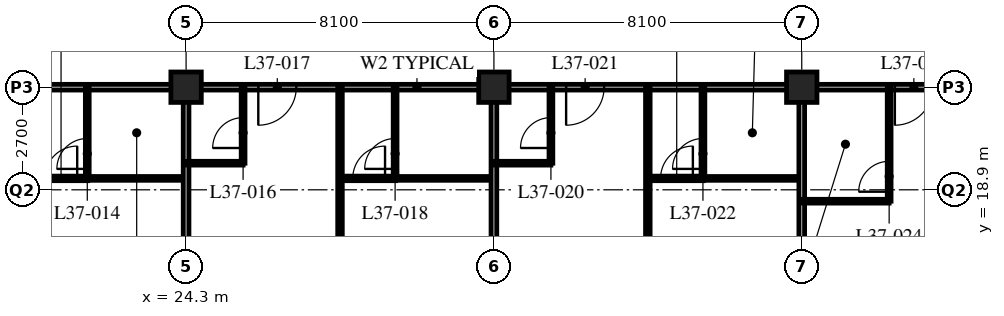
"""IFC4 building model, lengths in metres.
Left out: names, types, materials, properties, quantities, classifications, styles, units other than length and angle.
Written with IfcOpenShell. Run it as: python <this file> out.ifc"""

import sys

from ifc_helpers import new_model, si_unit, direction, frame, frame_2d, origin, origin_2d, place, context, subcontext, project, spatial, rectangle, hollow_rectangle, extrude, element, fill, save


model = new_model("IFC4")
c1 = context("Model", 3, precision=1e-05, world=origin(), true_north=direction((0.0, 1.0)))
c2 = subcontext(c1, "Body", "Model", "MODEL_VIEW")
j1 = project(units=[si_unit("LENGTHUNIT", "METRE"), si_unit("PLANEANGLEUNIT", "RADIAN")], contexts=[c1])
p1 = place(None, origin())
s1 = spatial("IfcSite", under=j1, at=p1, CompositionType="ELEMENT")
p2 = place(p1, origin())
s2 = spatial("IfcBuilding", under=s1, at=p2, CompositionType="ELEMENT")
p3 = place(p2, frame((0.0, 0.0, 144.2)))
s3 = spatial("IfcBuildingStorey", under=s2, at=p3, CompositionType="ELEMENT", Elevation=144.2)
for number, where, z_axis, x_axis in (
    (1, (24.3, 21.6, 0.0), (0.0, 0.0, 1.0), (1.0, 0.0, 0.0)),
    (2, (32.4, 21.6, 0.0), (0.0, 0.0, 1.0), (1.0, 0.0, 0.0)),
    (3, (40.5, 21.6, 0.0), (0.0, 0.0, 1.0), (1.0, 0.0, 0.0)),
):
    element("IfcColumn", number, at=place(p3, frame(where, z_axis=z_axis, x_axis=x_axis)), inside=s3, PredefinedType="COLUMN", context=c2, shape_type="SweptSolid", body=[
        extrude(hollow_rectangle(XDim=0.8, YDim=0.8, WallThickness=0.08, at=origin_2d()), origin(), (0.0, 0.0, 1.0), 3.4),
    ])
p4 = place(p3, frame((12.15, 21.6, 0.0), z_axis=(0.0, 0.0, 1.0), x_axis=(1.0, 0.0, 0.0)))
e4 = element("IfcWall", 4, at=p4, inside=s3, PredefinedType="PARTITIONING", context=c2, shape_type="SweptSolid", body=[
    extrude(rectangle(XDim=36.45, YDim=0.15, at=frame_2d((18.225, 0.0))), origin(), (0.0, 0.0, 1.0), 2.42),
])
p5 = place(p4, frame((5.95, 0.0, 0.0)))
e5 = element("IfcOpeningElement", 5, at=p5, cuts=e4, PredefinedType="OPENING", context=c2, shape_type="SweptSolid", body=[
    extrude(rectangle(XDim=1.0, YDim=2.1, at=frame_2d((0.5, 1.05))), frame((0.0, 0.085, 0.0), z_axis=(0.0, -1.0, 0.0), x_axis=(1.0, 0.0, 0.0)), (0.0, 0.0, 1.0), 0.17),
])
p6 = place(p4, frame((14.05, 0.0, 0.0)))
e6 = element("IfcOpeningElement", 6, at=p6, cuts=e4, PredefinedType="OPENING", context=c2, shape_type="SweptSolid", body=[
    extrude(rectangle(XDim=1.0, YDim=2.1, at=frame_2d((0.5, 1.05))), frame((0.0, 0.085, 0.0), z_axis=(0.0, -1.0, 0.0), x_axis=(1.0, 0.0, 0.0)), (0.0, 0.0, 1.0), 0.17),
])
p7 = place(p4, frame((22.15, 0.0, 0.0)))
e7 = element("IfcOpeningElement", 7, at=p7, cuts=e4, PredefinedType="OPENING", context=c2, shape_type="SweptSolid", body=[
    extrude(rectangle(XDim=1.0, YDim=2.1, at=frame_2d((0.5, 1.05))), frame((0.0, 0.085, 0.0), z_axis=(0.0, -1.0, 0.0), x_axis=(1.0, 0.0, 0.0)), (0.0, 0.0, 1.0), 0.17),
])
p8 = place(p4, frame((30.8, 0.0, 0.0)))
e8 = element("IfcOpeningElement", 8, at=p8, cuts=e4, PredefinedType="OPENING", context=c2, shape_type="SweptSolid", body=[
    extrude(rectangle(XDim=1.0, YDim=2.1, at=frame_2d((0.5, 1.05))), frame((0.0, 0.085, 0.0), z_axis=(0.0, -1.0, 0.0), x_axis=(1.0, 0.0, 0.0)), (0.0, 0.0, 1.0), 0.17),
])
p9 = place(p4, frame((1.525, 0.0, 0.0)))
e9 = element("IfcOpeningElement", 9, at=p9, cuts=e4, PredefinedType="OPENING", context=c2, shape_type="SweptSolid", body=[
    extrude(rectangle(XDim=1.0, YDim=2.1, at=frame_2d((0.5, 1.05))), frame((0.0, 0.085, 0.0), z_axis=(0.0, -1.0, 0.0), x_axis=(1.0, 0.0, 0.0)), (0.0, 0.0, 1.0), 0.17),
])
p10 = place(p4, frame((33.925, 0.0, 0.0)))
e10 = element("IfcOpeningElement", 10, at=p10, cuts=e4, PredefinedType="OPENING", context=c2, shape_type="SweptSolid", body=[
    extrude(rectangle(XDim=1.0, YDim=2.1, at=frame_2d((0.5, 1.05))), frame((0.0, 0.085, 0.0), z_axis=(0.0, -1.0, 0.0), x_axis=(1.0, 0.0, 0.0)), (0.0, 0.0, 1.0), 0.17),
])
p11 = place(p3, frame((21.7, 19.2, 0.0), z_axis=(0.0, 0.0, 1.0), x_axis=(1.0, 0.0, 0.0)))
e11 = element("IfcWall", 11, at=p11, inside=s3, PredefinedType="PARTITIONING", context=c2, shape_type="SweptSolid", body=[
    extrude(rectangle(XDim=2.6, YDim=0.1, at=frame_2d((1.3, 0.0))), origin(), (0.0, 0.0, 1.0), 3.19),
])
p12 = place(p3, frame((21.7, 21.6, 0.0), z_axis=(0.0, 0.0, 1.0), x_axis=(0.0, -1.0, 0.0)))
e12 = element("IfcWall", 12, at=p12, inside=s3, PredefinedType="PARTITIONING", context=c2, shape_type="SweptSolid", body=[
    extrude(rectangle(XDim=2.4, YDim=0.1, at=frame_2d((1.2, 0.0))), origin(), (0.0, 0.0, 1.0), 3.19),
])
p13 = place(p12, frame((1.35, 0.0, 0.0)))
e13 = element("IfcOpeningElement", 13, at=p13, cuts=e12, PredefinedType="OPENING", context=c2, shape_type="SweptSolid", body=[
    extrude(rectangle(XDim=0.8, YDim=2.1, at=frame_2d((0.4, 1.05))), frame((0.0, 0.06, 0.0), z_axis=(0.0, -1.0, 0.0), x_axis=(1.0, 0.0, 0.0)), (0.0, 0.0, 1.0), 0.12),
])
p14 = place(p3, frame((24.3, 21.6, 0.0), z_axis=(0.0, 0.0, 1.0), x_axis=(0.0, -1.0, 0.0)))
e14 = element("IfcWall", 14, at=p14, inside=s3, PredefinedType="PARTITIONING", context=c2, shape_type="SweptSolid", body=[
    extrude(rectangle(XDim=15.9, YDim=0.15, at=frame_2d((7.95, 0.0))), origin(), (0.0, 0.0, 1.0), 2.42),
])
p15 = place(p3, frame((24.3, 19.6, 0.0), z_axis=(0.0, 0.0, 1.0), x_axis=(1.0, 0.0, 0.0)))
e15 = element("IfcWall", 15, at=p15, inside=s3, PredefinedType="PARTITIONING", context=c2, shape_type="SweptSolid", body=[
    extrude(rectangle(XDim=1.5, YDim=0.1, at=frame_2d((0.75, 0.0))), origin(), (0.0, 0.0, 1.0), 3.19),
])
p16 = place(p3, frame((25.8, 21.6, 0.0), z_axis=(0.0, 0.0, 1.0), x_axis=(0.0, -1.0, 0.0)))
e16 = element("IfcWall", 16, at=p16, inside=s3, PredefinedType="PARTITIONING", context=c2, shape_type="SweptSolid", body=[
    extrude(rectangle(XDim=2.0, YDim=0.1, at=frame_2d((1.0, 0.0))), origin(), (0.0, 0.0, 1.0), 3.19),
])
p17 = place(p16, frame((0.8, 0.0, 0.0)))
e17 = element("IfcOpeningElement", 17, at=p17, cuts=e16, PredefinedType="OPENING", context=c2, shape_type="SweptSolid", body=[
    extrude(rectangle(XDim=0.8, YDim=2.1, at=frame_2d((0.4, 1.05))), frame((0.0, 0.06, 0.0), z_axis=(0.0, -1.0, 0.0), x_axis=(1.0, 0.0, 0.0)), (0.0, 0.0, 1.0), 0.12),
])
p18 = place(p3, frame((29.8, 19.2, 0.0), z_axis=(0.0, 0.0, 1.0), x_axis=(1.0, 0.0, 0.0)))
e18 = element("IfcWall", 18, at=p18, inside=s3, PredefinedType="PARTITIONING", context=c2, shape_type="SweptSolid", body=[
    extrude(rectangle(XDim=2.6, YDim=0.1, at=frame_2d((1.3, 0.0))), origin(), (0.0, 0.0, 1.0), 3.19),
])
p19 = place(p3, frame((29.8, 21.6, 0.0), z_axis=(0.0, 0.0, 1.0), x_axis=(0.0, -1.0, 0.0)))
e19 = element("IfcWall", 19, at=p19, inside=s3, PredefinedType="PARTITIONING", context=c2, shape_type="SweptSolid", body=[
    extrude(rectangle(XDim=2.4, YDim=0.1, at=frame_2d((1.2, 0.0))), origin(), (0.0, 0.0, 1.0), 3.19),
])
p20 = place(p19, frame((1.35, 0.0, 0.0)))
e20 = element("IfcOpeningElement", 20, at=p20, cuts=e19, PredefinedType="OPENING", context=c2, shape_type="SweptSolid", body=[
    extrude(rectangle(XDim=0.8, YDim=2.1, at=frame_2d((0.4, 1.05))), frame((0.0, 0.06, 0.0), z_axis=(0.0, -1.0, 0.0), x_axis=(1.0, 0.0, 0.0)), (0.0, 0.0, 1.0), 0.12),
])
p21 = place(p3, frame((28.35, 21.6, 0.0), z_axis=(0.0, 0.0, 1.0), x_axis=(0.0, -1.0, 0.0)))
e21 = element("IfcWall", 21, at=p21, inside=s3, PredefinedType="PARTITIONING", context=c2, shape_type="SweptSolid", body=[
    extrude(rectangle(XDim=15.9, YDim=0.12, at=frame_2d((7.95, 0.0))), origin(), (0.0, 0.0, 1.0), 3.19),
])
p22 = place(p21, frame((8.875, 0.0, 0.0)))
e22 = element("IfcOpeningElement", 22, at=p22, cuts=e21, PredefinedType="OPENING", context=c2, shape_type="SweptSolid", body=[
    extrude(rectangle(XDim=0.85, YDim=2.1, at=frame_2d((0.425, 1.05))), frame((0.0, 0.07, 0.0), z_axis=(0.0, -1.0, 0.0), x_axis=(1.0, 0.0, 0.0)), (0.0, 0.0, 1.0), 0.14),
])
p23 = place(p3, frame((32.4, 21.6, 0.0), z_axis=(0.0, 0.0, 1.0), x_axis=(0.0, -1.0, 0.0)))
e23 = element("IfcWall", 23, at=p23, inside=s3, PredefinedType="PARTITIONING", context=c2, shape_type="SweptSolid", body=[
    extrude(rectangle(XDim=15.9, YDim=0.15, at=frame_2d((7.95, 0.0))), origin(), (0.0, 0.0, 1.0), 2.42),
])
p24 = place(p3, frame((32.4, 19.6, 0.0), z_axis=(0.0, 0.0, 1.0), x_axis=(1.0, 0.0, 0.0)))
e24 = element("IfcWall", 24, at=p24, inside=s3, PredefinedType="PARTITIONING", context=c2, shape_type="SweptSolid", body=[
    extrude(rectangle(XDim=1.5, YDim=0.1, at=frame_2d((0.75, 0.0))), origin(), (0.0, 0.0, 1.0), 3.19),
])
p25 = place(p3, frame((33.9, 21.6, 0.0), z_axis=(0.0, 0.0, 1.0), x_axis=(0.0, -1.0, 0.0)))
e25 = element("IfcWall", 25, at=p25, inside=s3, PredefinedType="PARTITIONING", context=c2, shape_type="SweptSolid", body=[
    extrude(rectangle(XDim=2.0, YDim=0.1, at=frame_2d((1.0, 0.0))), origin(), (0.0, 0.0, 1.0), 3.19),
])
p26 = place(p25, frame((0.8, 0.0, 0.0)))
e26 = element("IfcOpeningElement", 26, at=p26, cuts=e25, PredefinedType="OPENING", context=c2, shape_type="SweptSolid", body=[
    extrude(rectangle(XDim=0.8, YDim=2.1, at=frame_2d((0.4, 1.05))), frame((0.0, 0.06, 0.0), z_axis=(0.0, -1.0, 0.0), x_axis=(1.0, 0.0, 0.0)), (0.0, 0.0, 1.0), 0.12),
])
p27 = place(p3, frame((37.9, 19.2, 0.0), z_axis=(0.0, 0.0, 1.0), x_axis=(1.0, 0.0, 0.0)))
e27 = element("IfcWall", 27, at=p27, inside=s3, PredefinedType="PARTITIONING", context=c2, shape_type="SweptSolid", body=[
    extrude(rectangle(XDim=2.6, YDim=0.1, at=frame_2d((1.3, 0.0))), origin(), (0.0, 0.0, 1.0), 3.19),
])
p28 = place(p3, frame((37.9, 21.6, 0.0), z_axis=(0.0, 0.0, 1.0), x_axis=(0.0, -1.0, 0.0)))
e28 = element("IfcWall", 28, at=p28, inside=s3, PredefinedType="PARTITIONING", context=c2, shape_type="SweptSolid", body=[
    extrude(rectangle(XDim=2.4, YDim=0.1, at=frame_2d((1.2, 0.0))), origin(), (0.0, 0.0, 1.0), 3.19),
])
p29 = place(p28, frame((1.35, 0.0, 0.0)))
e29 = element("IfcOpeningElement", 29, at=p29, cuts=e28, PredefinedType="OPENING", context=c2, shape_type="SweptSolid", body=[
    extrude(rectangle(XDim=0.8, YDim=2.1, at=frame_2d((0.4, 1.05))), frame((0.0, 0.06, 0.0), z_axis=(0.0, -1.0, 0.0), x_axis=(1.0, 0.0, 0.0)), (0.0, 0.0, 1.0), 0.12),
])
p30 = place(p3, frame((36.45, 21.6, 0.0), z_axis=(0.0, 0.0, 1.0), x_axis=(0.0, -1.0, 0.0)))
e30 = element("IfcWall", 30, at=p30, inside=s3, PredefinedType="PARTITIONING", context=c2, shape_type="SweptSolid", body=[
    extrude(rectangle(XDim=15.9, YDim=0.12, at=frame_2d((7.95, 0.0))), origin(), (0.0, 0.0, 1.0), 3.19),
])
p31 = place(p30, frame((8.875, 0.0, 0.0)))
e31 = element("IfcOpeningElement", 31, at=p31, cuts=e30, PredefinedType="OPENING", context=c2, shape_type="SweptSolid", body=[
    extrude(rectangle(XDim=0.85, YDim=2.1, at=frame_2d((0.425, 1.05))), frame((0.0, 0.07, 0.0), z_axis=(0.0, -1.0, 0.0), x_axis=(1.0, 0.0, 0.0)), (0.0, 0.0, 1.0), 0.14),
])
p32 = place(p3, frame((40.5, 21.6, 0.0), z_axis=(0.0, 0.0, 1.0), x_axis=(0.0, -1.0, 0.0)))
e32 = element("IfcWall", 32, at=p32, inside=s3, PredefinedType="PARTITIONING", context=c2, shape_type="SweptSolid", body=[
    extrude(rectangle(XDim=15.9, YDim=0.15, at=frame_2d((7.95, 0.0))), origin(), (0.0, 0.0, 1.0), 2.42),
])
p33 = place(p3, frame((40.5, 18.6, 0.0), z_axis=(0.0, 0.0, 1.0), x_axis=(1.0, 0.0, 0.0)))
e33 = element("IfcWall", 33, at=p33, inside=s3, PredefinedType="PARTITIONING", context=c2, shape_type="SweptSolid", body=[
    extrude(rectangle(XDim=2.3, YDim=0.1, at=frame_2d((1.15, 0.0))), origin(), (0.0, 0.0, 1.0), 3.19),
])
p34 = place(p3, frame((42.8, 21.6, 0.0), z_axis=(0.0, 0.0, 1.0), x_axis=(0.0, -1.0, 0.0)))
e34 = element("IfcWall", 34, at=p34, inside=s3, PredefinedType="PARTITIONING", context=c2, shape_type="SweptSolid", body=[
    extrude(rectangle(XDim=3.0, YDim=0.1, at=frame_2d((1.5, 0.0))), origin(), (0.0, 0.0, 1.0), 3.19),
])
p35 = place(p34, frame((1.95, 0.0, 0.0)))
e35 = element("IfcOpeningElement", 35, at=p35, cuts=e34, PredefinedType="OPENING", context=c2, shape_type="SweptSolid", body=[
    extrude(rectangle(XDim=0.8, YDim=2.1, at=frame_2d((0.4, 1.05))), frame((0.0, 0.06, 0.0), z_axis=(0.0, -1.0, 0.0), x_axis=(1.0, 0.0, 0.0)), (0.0, 0.0, 1.0), 0.12),
])
p36 = place(p3, frame((21.71, 19.2, 0.0), z_axis=(0.0, 0.0, 1.0), x_axis=(-1.0, 0.0, 0.0)))
e36 = element("IfcWall", 36, at=p36, inside=s3, PredefinedType="PARTITIONING", context=c2, shape_type="SweptSolid", body=[
    extrude(rectangle(XDim=1.46, YDim=0.12, at=frame_2d((0.73, 0.0))), origin(), (0.0, 0.0, 1.0), 3.19),
])
p37 = place(p36, frame((0.275, 0.0, 0.0)))
e37 = element("IfcOpeningElement", 37, at=p37, cuts=e36, PredefinedType="OPENING", context=c2, shape_type="SweptSolid", body=[
    extrude(rectangle(XDim=0.85, YDim=2.1, at=frame_2d((0.425, 1.05))), frame((0.0, 0.07, 0.0), z_axis=(0.0, -1.0, 0.0), x_axis=(1.0, 0.0, 0.0)), (0.0, 0.0, 1.0), 0.14),
])
p38 = place(p3, frame((29.81, 19.2, 0.0), z_axis=(0.0, 0.0, 1.0), x_axis=(-1.0, 0.0, 0.0)))
e38 = element("IfcWall", 38, at=p38, inside=s3, PredefinedType="PARTITIONING", context=c2, shape_type="SweptSolid", body=[
    extrude(rectangle(XDim=1.46, YDim=0.12, at=frame_2d((0.73, 0.0))), origin(), (0.0, 0.0, 1.0), 3.19),
])
p39 = place(p38, frame((0.275, 0.0, 0.0)))
e39 = element("IfcOpeningElement", 39, at=p39, cuts=e38, PredefinedType="OPENING", context=c2, shape_type="SweptSolid", body=[
    extrude(rectangle(XDim=0.85, YDim=2.1, at=frame_2d((0.425, 1.05))), frame((0.0, 0.07, 0.0), z_axis=(0.0, -1.0, 0.0), x_axis=(1.0, 0.0, 0.0)), (0.0, 0.0, 1.0), 0.14),
])
p40 = place(p3, frame((37.91, 19.2, 0.0), z_axis=(0.0, 0.0, 1.0), x_axis=(-1.0, 0.0, 0.0)))
e40 = element("IfcWall", 40, at=p40, inside=s3, PredefinedType="PARTITIONING", context=c2, shape_type="SweptSolid", body=[
    extrude(rectangle(XDim=1.46, YDim=0.12, at=frame_2d((0.73, 0.0))), origin(), (0.0, 0.0, 1.0), 3.19),
])
p41 = place(p40, frame((0.275, 0.0, 0.0)))
e41 = element("IfcOpeningElement", 41, at=p41, cuts=e40, PredefinedType="OPENING", context=c2, shape_type="SweptSolid", body=[
    extrude(rectangle(XDim=0.85, YDim=2.1, at=frame_2d((0.425, 1.05))), frame((0.0, 0.07, 0.0), z_axis=(0.0, -1.0, 0.0), x_axis=(1.0, 0.0, 0.0)), (0.0, 0.0, 1.0), 0.14),
])
p42 = place(p13, origin())
e42 = element("IfcDoor", 42, at=p42, inside=s3, OperationType="SINGLE_SWING_LEFT", PredefinedType="DOOR", context=c2, shape_type="SweptSolid", body=[
    extrude(rectangle(XDim=0.8, YDim=2.1, at=frame_2d((0.4, 1.05))), frame((0.0, 0.025, 0.0), z_axis=(0.0, -1.0, 0.0), x_axis=(1.0, 0.0, 0.0)), (0.0, 0.0, 1.0), 0.05),
])
fill(e13, e42)
p43 = place(p17, origin())
e43 = element("IfcDoor", 43, at=p43, inside=s3, OperationType="SINGLE_SWING_LEFT", PredefinedType="DOOR", context=c2, shape_type="SweptSolid", body=[
    extrude(rectangle(XDim=0.8, YDim=2.1, at=frame_2d((0.4, 1.05))), frame((0.0, 0.025, 0.0), z_axis=(0.0, -1.0, 0.0), x_axis=(1.0, 0.0, 0.0)), (0.0, 0.0, 1.0), 0.05),
])
fill(e17, e43)
p44 = place(p6, origin())
e44 = element("IfcDoor", 44, at=p44, inside=s3, OperationType="SINGLE_SWING_RIGHT", PredefinedType="DOOR", context=c2, shape_type="SweptSolid", body=[
    extrude(rectangle(XDim=1.0, YDim=2.1, at=frame_2d((0.5, 1.05))), frame((0.0, 0.025, 0.0), z_axis=(0.0, -1.0, 0.0), x_axis=(1.0, 0.0, 0.0)), (0.0, 0.0, 1.0), 0.05),
])
fill(e6, e44)
p45 = place(p20, origin())
e45 = element("IfcDoor", 45, at=p45, inside=s3, OperationType="SINGLE_SWING_LEFT", PredefinedType="DOOR", context=c2, shape_type="SweptSolid", body=[
    extrude(rectangle(XDim=0.8, YDim=2.1, at=frame_2d((0.4, 1.05))), frame((0.0, 0.025, 0.0), z_axis=(0.0, -1.0, 0.0), x_axis=(1.0, 0.0, 0.0)), (0.0, 0.0, 1.0), 0.05),
])
fill(e20, e45)
p46 = place(p26, origin())
e46 = element("IfcDoor", 46, at=p46, inside=s3, OperationType="SINGLE_SWING_LEFT", PredefinedType="DOOR", context=c2, shape_type="SweptSolid", body=[
    extrude(rectangle(XDim=0.8, YDim=2.1, at=frame_2d((0.4, 1.05))), frame((0.0, 0.025, 0.0), z_axis=(0.0, -1.0, 0.0), x_axis=(1.0, 0.0, 0.0)), (0.0, 0.0, 1.0), 0.05),
])
fill(e26, e46)
p47 = place(p7, origin())
e47 = element("IfcDoor", 47, at=p47, inside=s3, OperationType="SINGLE_SWING_RIGHT", PredefinedType="DOOR", context=c2, shape_type="SweptSolid", body=[
    extrude(rectangle(XDim=1.0, YDim=2.1, at=frame_2d((0.5, 1.05))), frame((0.0, 0.025, 0.0), z_axis=(0.0, -1.0, 0.0), x_axis=(1.0, 0.0, 0.0)), (0.0, 0.0, 1.0), 0.05),
])
fill(e7, e47)
p48 = place(p29, origin())
e48 = element("IfcDoor", 48, at=p48, inside=s3, OperationType="SINGLE_SWING_LEFT", PredefinedType="DOOR", context=c2, shape_type="SweptSolid", body=[
    extrude(rectangle(XDim=0.8, YDim=2.1, at=frame_2d((0.4, 1.05))), frame((0.0, 0.025, 0.0), z_axis=(0.0, -1.0, 0.0), x_axis=(1.0, 0.0, 0.0)), (0.0, 0.0, 1.0), 0.05),
])
fill(e29, e48)
p49 = place(p35, origin())
e49 = element("IfcDoor", 49, at=p49, inside=s3, OperationType="SINGLE_SWING_LEFT", PredefinedType="DOOR", context=c2, shape_type="SweptSolid", body=[
    extrude(rectangle(XDim=0.8, YDim=2.1, at=frame_2d((0.4, 1.05))), frame((0.0, 0.025, 0.0), z_axis=(0.0, -1.0, 0.0), x_axis=(1.0, 0.0, 0.0)), (0.0, 0.0, 1.0), 0.05),
])
fill(e35, e49)
p50 = place(p8, origin())
e50 = element("IfcDoor", 50, at=p50, inside=s3, OperationType="SINGLE_SWING_RIGHT", PredefinedType="DOOR", context=c2, shape_type="SweptSolid", body=[
    extrude(rectangle(XDim=1.0, YDim=2.1, at=frame_2d((0.5, 1.05))), frame((0.0, 0.025, 0.0), z_axis=(0.0, -1.0, 0.0), x_axis=(1.0, 0.0, 0.0)), (0.0, 0.0, 1.0), 0.05),
])
fill(e8, e50)
p51 = place(p37, origin())
e51 = element("IfcDoor", 51, at=p51, inside=s3, OperationType="SINGLE_SWING_RIGHT", PredefinedType="DOOR", context=c2, shape_type="SweptSolid", body=[
    extrude(rectangle(XDim=0.85, YDim=2.1, at=frame_2d((0.425, 1.05))), frame((0.0, 0.025, 0.0), z_axis=(0.0, -1.0, 0.0), x_axis=(1.0, 0.0, 0.0)), (0.0, 0.0, 1.0), 0.05),
])
fill(e37, e51)
p52 = place(p39, origin())
e52 = element("IfcDoor", 52, at=p52, inside=s3, OperationType="SINGLE_SWING_RIGHT", PredefinedType="DOOR", context=c2, shape_type="SweptSolid", body=[
    extrude(rectangle(XDim=0.85, YDim=2.1, at=frame_2d((0.425, 1.05))), frame((0.0, 0.025, 0.0), z_axis=(0.0, -1.0, 0.0), x_axis=(1.0, 0.0, 0.0)), (0.0, 0.0, 1.0), 0.05),
])
fill(e39, e52)
p53 = place(p41, origin())
e53 = element("IfcDoor", 53, at=p53, inside=s3, OperationType="SINGLE_SWING_RIGHT", PredefinedType="DOOR", context=c2, shape_type="SweptSolid", body=[
    extrude(rectangle(XDim=0.85, YDim=2.1, at=frame_2d((0.425, 1.05))), frame((0.0, 0.025, 0.0), z_axis=(0.0, -1.0, 0.0), x_axis=(1.0, 0.0, 0.0)), (0.0, 0.0, 1.0), 0.05),
])
fill(e41, e53)
save(model, sys.argv[1])
